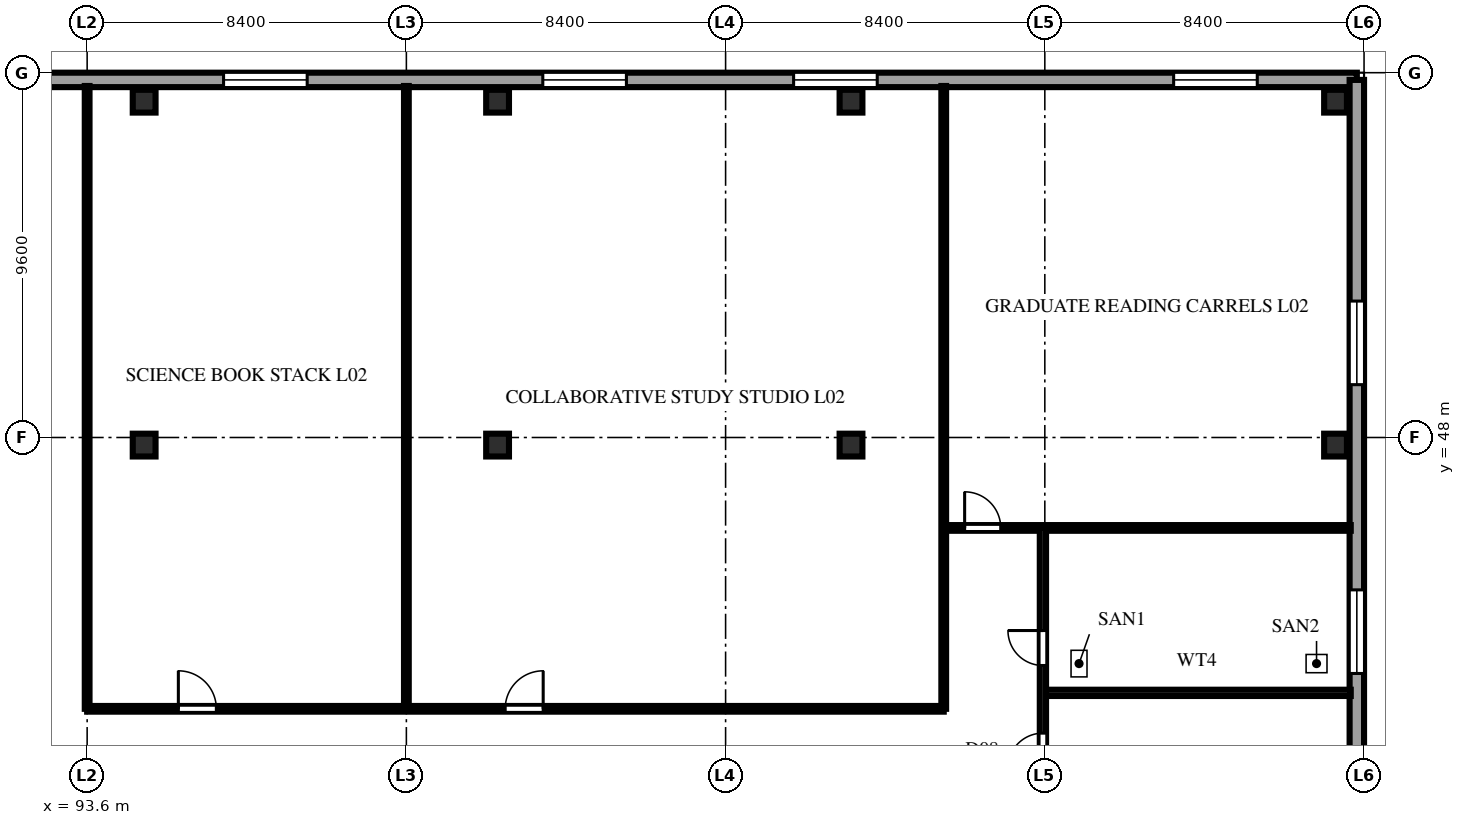
"""IFC4 building model, lengths in metres.
Left out: names, types, materials, properties, quantities, classifications, styles, units other than length and angle.
Written with IfcOpenShell. Run it as: python <this file> out.ifc"""

import sys

from ifc_helpers import new_model, si_unit, direction, frame, frame_2d, origin, origin_2d, place, context, subcontext, project, spatial, rectangle, extrude, element, fill, save


model = new_model("IFC4")
c1 = context("Model", 3, precision=1e-05, world=origin(), true_north=direction((0.0, 1.0)))
c2 = subcontext(c1, "Body", "Model", "MODEL_VIEW")
j1 = project(units=[si_unit("LENGTHUNIT", "METRE"), si_unit("PLANEANGLEUNIT", "RADIAN")], contexts=[c1])
p1 = place(None, origin())
s1 = spatial("IfcSite", under=j1, at=p1, CompositionType="ELEMENT")
p2 = place(p1, origin())
s2 = spatial("IfcBuilding", under=s1, at=p2, CompositionType="ELEMENT")
p3 = place(p2, frame((0.0, 0.0, 10.4)))
s3 = spatial("IfcBuildingStorey", under=s2, at=p3, CompositionType="ELEMENT", Elevation=10.4)
for number, where, z_axis, x_axis in (
    (1, (95.1, 47.8, 0.0), (0.0, 0.0, 1.0), (1.0, 0.0, 0.0)),
    (2, (95.1, 56.85, 0.0), (0.0, 0.0, 1.0), (1.0, 0.0, 0.0)),
    (3, (104.4, 47.8, 0.0), (0.0, 0.0, 1.0), (1.0, 0.0, 0.0)),
    (4, (104.4, 56.85, 0.0), (0.0, 0.0, 1.0), (1.0, 0.0, 0.0)),
    (5, (113.7, 47.8, 0.0), (0.0, 0.0, 1.0), (1.0, 0.0, 0.0)),
    (6, (113.7, 56.85, 0.0), (0.0, 0.0, 1.0), (1.0, 0.0, 0.0)),
    (7, (126.45, 47.8, 0.0), (0.0, 0.0, 1.0), (1.0, 0.0, 0.0)),
    (8, (126.45, 56.85, 0.0), (0.0, 0.0, 1.0), (1.0, 0.0, 0.0)),
):
    element("IfcColumn", number, at=place(p3, frame(where, z_axis=z_axis, x_axis=x_axis)), inside=s3, PredefinedType="COLUMN", context=c2, shape_type="SweptSolid", body=[
        extrude(rectangle(XDim=0.6, YDim=0.6, at=origin_2d()), origin(), (0.0, 0.0, 1.0), 4.6),
    ])
p4 = place(p3, frame((85.39, 57.41, 0.0), z_axis=(0.0, 0.0, 1.0), x_axis=(1.0, 0.0, 0.0)))
e9 = element("IfcWall", 9, at=p4, inside=s3, PredefinedType="SOLIDWALL", context=c2, shape_type="SweptSolid", body=[
    extrude(rectangle(XDim=41.62, YDim=0.38, at=frame_2d((20.81, 0.0))), origin(), (0.0, 0.0, 1.0), 4.25),
])
p5 = place(p4, frame((5.0, 0.0, 0.85)))
e10 = element("IfcOpeningElement", 10, at=p5, cuts=e9, PredefinedType="OPENING", context=c2, shape_type="SweptSolid", body=[
    extrude(rectangle(XDim=2.2, YDim=2.25, at=frame_2d((1.1, 1.125))), frame((0.0, 0.202, 0.0), z_axis=(0.0, -1.0, 0.0), x_axis=(1.0, 0.0, 0.0)), (0.0, 0.0, 1.0), 0.404),
])
p6 = place(p4, frame((11.8, 0.0, 0.85)))
e11 = element("IfcOpeningElement", 11, at=p6, cuts=e9, PredefinedType="OPENING", context=c2, shape_type="SweptSolid", body=[
    extrude(rectangle(XDim=2.2, YDim=2.25, at=frame_2d((1.1, 1.125))), frame((0.0, 0.202, 0.0), z_axis=(0.0, -1.0, 0.0), x_axis=(1.0, 0.0, 0.0)), (0.0, 0.0, 1.0), 0.404),
])
p7 = place(p4, frame((20.2, 0.0, 0.85)))
e12 = element("IfcOpeningElement", 12, at=p7, cuts=e9, PredefinedType="OPENING", context=c2, shape_type="SweptSolid", body=[
    extrude(rectangle(XDim=2.2, YDim=2.25, at=frame_2d((1.1, 1.125))), frame((0.0, 0.202, 0.0), z_axis=(0.0, -1.0, 0.0), x_axis=(1.0, 0.0, 0.0)), (0.0, 0.0, 1.0), 0.404),
])
p8 = place(p4, frame((26.8, 0.0, 0.85)))
e13 = element("IfcOpeningElement", 13, at=p8, cuts=e9, PredefinedType="OPENING", context=c2, shape_type="SweptSolid", body=[
    extrude(rectangle(XDim=2.2, YDim=2.25, at=frame_2d((1.1, 1.125))), frame((0.0, 0.202, 0.0), z_axis=(0.0, -1.0, 0.0), x_axis=(1.0, 0.0, 0.0)), (0.0, 0.0, 1.0), 0.404),
])
p9 = place(p4, frame((36.8, 0.0, 0.85)))
e14 = element("IfcOpeningElement", 14, at=p9, cuts=e9, PredefinedType="OPENING", context=c2, shape_type="SweptSolid", body=[
    extrude(rectangle(XDim=2.2, YDim=2.25, at=frame_2d((1.1, 1.125))), frame((0.0, 0.202, 0.0), z_axis=(0.0, -1.0, 0.0), x_axis=(1.0, 0.0, 0.0)), (0.0, 0.0, 1.0), 0.404),
])
p10 = place(p3, frame((127.01, 0.19, 0.0), z_axis=(0.0, 0.0, 1.0), x_axis=(0.0, 1.0, 0.0)))
e15 = element("IfcWall", 15, at=p10, inside=s3, PredefinedType="SOLIDWALL", context=c2, shape_type="SweptSolid", body=[
    extrude(rectangle(XDim=57.22, YDim=0.38, at=frame_2d((28.61, 0.0))), origin(), (0.0, 0.0, 1.0), 4.25),
])
p11 = place(p10, frame((3.6, 0.0, 0.85)))
e16 = element("IfcOpeningElement", 16, at=p11, cuts=e15, PredefinedType="OPENING", context=c2, shape_type="SweptSolid", body=[
    extrude(rectangle(XDim=2.2, YDim=2.25, at=frame_2d((1.1, 1.125))), frame((0.0, 0.202, 0.0), z_axis=(0.0, -1.0, 0.0), x_axis=(1.0, 0.0, 0.0)), (0.0, 0.0, 1.0), 0.404),
])
p12 = place(p10, frame((11.2, 0.0, 0.85)))
e17 = element("IfcOpeningElement", 17, at=p12, cuts=e15, PredefinedType="OPENING", context=c2, shape_type="SweptSolid", body=[
    extrude(rectangle(XDim=2.2, YDim=2.25, at=frame_2d((1.1, 1.125))), frame((0.0, 0.202, 0.0), z_axis=(0.0, -1.0, 0.0), x_axis=(1.0, 0.0, 0.0)), (0.0, 0.0, 1.0), 0.404),
])
p13 = place(p10, frame((41.6, 0.0, 0.85)))
e18 = element("IfcOpeningElement", 18, at=p13, cuts=e15, PredefinedType="OPENING", context=c2, shape_type="SweptSolid", body=[
    extrude(rectangle(XDim=2.2, YDim=2.25, at=frame_2d((1.1, 1.125))), frame((0.0, 0.202, 0.0), z_axis=(0.0, -1.0, 0.0), x_axis=(1.0, 0.0, 0.0)), (0.0, 0.0, 1.0), 0.404),
])
p14 = place(p10, frame((49.2, 0.0, 0.85)))
e19 = element("IfcOpeningElement", 19, at=p14, cuts=e15, PredefinedType="OPENING", context=c2, shape_type="SweptSolid", body=[
    extrude(rectangle(XDim=2.2, YDim=2.25, at=frame_2d((1.1, 1.125))), frame((0.0, 0.202, 0.0), z_axis=(0.0, -1.0, 0.0), x_axis=(1.0, 0.0, 0.0)), (0.0, 0.0, 1.0), 0.404),
])
for number, where, z_axis, x_axis in (
    (20, (93.6, 40.86, 0.0), (0.0, 0.0, 1.0), (0.0, 1.0, 0.0)),
    (21, (102.0, 40.86, 0.0), (0.0, 0.0, 1.0), (0.0, 1.0, 0.0)),
    (22, (116.14, 40.86, 0.0), (0.0, 0.0, 1.0), (0.0, 1.0, 0.0)),
):
    element("IfcWall", number, at=place(p3, frame(where, z_axis=z_axis, x_axis=x_axis)), inside=s3, PredefinedType="PARTITIONING", context=c2, shape_type="SweptSolid", body=[
        extrude(rectangle(XDim=16.39, YDim=0.125, at=frame_2d((8.195, 0.0))), origin(), (0.0, 0.0, 1.0), 4.25),
    ])
p15 = place(p3, frame((93.6, 40.86, 0.0), z_axis=(0.0, 0.0, 1.0), x_axis=(1.0, 0.0, 0.0)))
e23 = element("IfcWall", 23, at=p15, inside=s3, PredefinedType="PARTITIONING", context=c2, shape_type="SweptSolid", body=[
    extrude(rectangle(XDim=22.54, YDim=0.15, at=frame_2d((11.27, 0.0))), origin(), (0.0, 0.0, 1.0), 4.25),
])
p16 = place(p15, frame((2.4, 0.0, 0.0)))
e24 = element("IfcOpeningElement", 24, at=p16, cuts=e23, PredefinedType="OPENING", context=c2, shape_type="SweptSolid", body=[
    extrude(rectangle(XDim=1.0, YDim=2.2, at=frame_2d((0.5, 1.1))), frame((0.0, 0.087, 0.0), z_axis=(0.0, -1.0, 0.0), x_axis=(1.0, 0.0, 0.0)), (0.0, 0.0, 1.0), 0.174),
])
p17 = place(p15, frame((11.0, 0.0, 0.0)))
e25 = element("IfcOpeningElement", 25, at=p17, cuts=e23, PredefinedType="OPENING", context=c2, shape_type="SweptSolid", body=[
    extrude(rectangle(XDim=1.0, YDim=2.2, at=frame_2d((0.5, 1.1))), frame((0.0, 0.087, 0.0), z_axis=(0.0, -1.0, 0.0), x_axis=(1.0, 0.0, 0.0)), (0.0, 0.0, 1.0), 0.174),
])
p18 = place(p3, frame((118.75, 41.28, 0.0), z_axis=(0.0, 0.0, 1.0), x_axis=(1.0, 0.0, 0.0)))
e26 = element("IfcWall", 26, at=p18, inside=s3, PredefinedType="PLUMBINGWALL", context=c2, shape_type="SweptSolid", body=[
    extrude(rectangle(XDim=8.1, YDim=0.165, at=frame_2d((4.05, 0.0))), origin(), (0.0, 0.0, 1.0), 4.25),
])
p19 = place(p3, frame((116.14, 45.62, 0.0), z_axis=(0.0, 0.0, 1.0), x_axis=(1.0, 0.0, 0.0)))
e27 = element("IfcWall", 27, at=p19, inside=s3, PredefinedType="PARTITIONING", context=c2, shape_type="SweptSolid", body=[
    extrude(rectangle(XDim=10.71, YDim=0.15, at=frame_2d((5.355, 0.0))), origin(), (0.0, 0.0, 1.0), 4.25),
])
p20 = place(p19, frame((0.55, 0.0, 0.0)))
e28 = element("IfcOpeningElement", 28, at=p20, cuts=e27, PredefinedType="OPENING", context=c2, shape_type="SweptSolid", body=[
    extrude(rectangle(XDim=0.95, YDim=2.15, at=frame_2d((0.475, 1.075))), frame((0.0, 0.087, 0.0), z_axis=(0.0, -1.0, 0.0), x_axis=(1.0, 0.0, 0.0)), (0.0, 0.0, 1.0), 0.174),
])
p21 = place(p3, frame((118.75, 38.4, 0.0), z_axis=(0.0, 0.0, 1.0), x_axis=(0.0, 1.0, 0.0)))
e29 = element("IfcWall", 29, at=p21, inside=s3, PredefinedType="PLUMBINGWALL", context=c2, shape_type="SweptSolid", body=[
    extrude(rectangle(XDim=7.22, YDim=0.165, at=frame_2d((3.61, 0.0))), origin(), (0.0, 0.0, 1.0), 4.25),
])
p22 = place(p21, frame((0.9, 0.0, 0.0)))
e30 = element("IfcOpeningElement", 30, at=p22, cuts=e29, PredefinedType="OPENING", context=c2, shape_type="SweptSolid", body=[
    extrude(rectangle(XDim=0.92, YDim=2.15, at=frame_2d((0.46, 1.075))), frame((0.0, 0.094, 0.0), z_axis=(0.0, -1.0, 0.0), x_axis=(1.0, 0.0, 0.0)), (0.0, 0.0, 1.0), 0.189),
])
p23 = place(p21, frame((3.6, 0.0, 0.0)))
e31 = element("IfcOpeningElement", 31, at=p23, cuts=e29, PredefinedType="OPENING", context=c2, shape_type="SweptSolid", body=[
    extrude(rectangle(XDim=0.92, YDim=2.15, at=frame_2d((0.46, 1.075))), frame((0.0, 0.094, 0.0), z_axis=(0.0, -1.0, 0.0), x_axis=(1.0, 0.0, 0.0)), (0.0, 0.0, 1.0), 0.189),
])
p24 = place(p6, origin())
e32 = element("IfcWindow", 32, at=p24, inside=s3, PartitioningType="DOUBLE_PANEL_VERTICAL", PredefinedType="WINDOW", context=c2, shape_type="SweptSolid", body=[
    extrude(rectangle(XDim=2.2, YDim=2.25, at=frame_2d((1.1, 1.125))), frame((0.0, 0.11, 0.0), z_axis=(0.0, -1.0, 0.0), x_axis=(1.0, 0.0, 0.0)), (0.0, 0.0, 1.0), 0.06),
])
fill(e11, e32)
p25 = place(p7, origin())
e33 = element("IfcWindow", 33, at=p25, inside=s3, PartitioningType="DOUBLE_PANEL_VERTICAL", PredefinedType="WINDOW", context=c2, shape_type="SweptSolid", body=[
    extrude(rectangle(XDim=2.2, YDim=2.25, at=frame_2d((1.1, 1.125))), frame((0.0, 0.11, 0.0), z_axis=(0.0, -1.0, 0.0), x_axis=(1.0, 0.0, 0.0)), (0.0, 0.0, 1.0), 0.06),
])
fill(e12, e33)
p26 = place(p8, origin())
e34 = element("IfcWindow", 34, at=p26, inside=s3, PartitioningType="DOUBLE_PANEL_VERTICAL", PredefinedType="WINDOW", context=c2, shape_type="SweptSolid", body=[
    extrude(rectangle(XDim=2.2, YDim=2.25, at=frame_2d((1.1, 1.125))), frame((0.0, 0.11, 0.0), z_axis=(0.0, -1.0, 0.0), x_axis=(1.0, 0.0, 0.0)), (0.0, 0.0, 1.0), 0.06),
])
fill(e13, e34)
p27 = place(p9, origin())
e35 = element("IfcWindow", 35, at=p27, inside=s3, PartitioningType="DOUBLE_PANEL_VERTICAL", PredefinedType="WINDOW", context=c2, shape_type="SweptSolid", body=[
    extrude(rectangle(XDim=2.2, YDim=2.25, at=frame_2d((1.1, 1.125))), frame((0.0, 0.11, 0.0), z_axis=(0.0, -1.0, 0.0), x_axis=(1.0, 0.0, 0.0)), (0.0, 0.0, 1.0), 0.06),
])
fill(e14, e35)
p28 = place(p13, origin())
e36 = element("IfcWindow", 36, at=p28, inside=s3, PartitioningType="DOUBLE_PANEL_VERTICAL", PredefinedType="WINDOW", context=c2, shape_type="SweptSolid", body=[
    extrude(rectangle(XDim=2.2, YDim=2.25, at=frame_2d((1.1, 1.125))), frame((0.0, 0.11, 0.0), z_axis=(0.0, -1.0, 0.0), x_axis=(1.0, 0.0, 0.0)), (0.0, 0.0, 1.0), 0.06),
])
fill(e18, e36)
p29 = place(p14, origin())
e37 = element("IfcWindow", 37, at=p29, inside=s3, PartitioningType="DOUBLE_PANEL_VERTICAL", PredefinedType="WINDOW", context=c2, shape_type="SweptSolid", body=[
    extrude(rectangle(XDim=2.2, YDim=2.25, at=frame_2d((1.1, 1.125))), frame((0.0, 0.11, 0.0), z_axis=(0.0, -1.0, 0.0), x_axis=(1.0, 0.0, 0.0)), (0.0, 0.0, 1.0), 0.06),
])
fill(e19, e37)
p30 = place(p16, origin())
e38 = element("IfcDoor", 38, at=p30, inside=s3, OperationType="SINGLE_SWING_LEFT", PredefinedType="DOOR", context=c2, shape_type="SweptSolid", body=[
    extrude(rectangle(XDim=1.0, YDim=2.2, at=frame_2d((0.5, 1.1))), frame((0.0, 0.025, 0.0), z_axis=(0.0, -1.0, 0.0), x_axis=(1.0, 0.0, 0.0)), (0.0, 0.0, 1.0), 0.05),
])
fill(e24, e38)
p31 = place(p17, origin())
e39 = element("IfcDoor", 39, at=p31, inside=s3, OperationType="SINGLE_SWING_RIGHT", PredefinedType="DOOR", context=c2, shape_type="SweptSolid", body=[
    extrude(rectangle(XDim=1.0, YDim=2.2, at=frame_2d((0.5, 1.1))), frame((0.0, 0.025, 0.0), z_axis=(0.0, -1.0, 0.0), x_axis=(1.0, 0.0, 0.0)), (0.0, 0.0, 1.0), 0.05),
])
fill(e25, e39)
p32 = place(p20, origin())
e40 = element("IfcDoor", 40, at=p32, inside=s3, OperationType="SINGLE_SWING_LEFT", PredefinedType="DOOR", context=c2, shape_type="SweptSolid", body=[
    extrude(rectangle(XDim=0.95, YDim=2.15, at=frame_2d((0.475, 1.075))), frame((0.0, 0.025, 0.0), z_axis=(0.0, -1.0, 0.0), x_axis=(1.0, 0.0, 0.0)), (0.0, 0.0, 1.0), 0.05),
])
fill(e28, e40)
p33 = place(p22, origin())
e41 = element("IfcDoor", 41, at=p33, inside=s3, OperationType="SINGLE_SWING_LEFT", PredefinedType="DOOR", context=c2, shape_type="SweptSolid", body=[
    extrude(rectangle(XDim=0.92, YDim=2.15, at=frame_2d((0.46, 1.075))), frame((0.0, 0.025, 0.0), z_axis=(0.0, -1.0, 0.0), x_axis=(1.0, 0.0, 0.0)), (0.0, 0.0, 1.0), 0.05),
])
fill(e30, e41)
p34 = place(p23, origin())
e42 = element("IfcDoor", 42, at=p34, inside=s3, OperationType="SINGLE_SWING_RIGHT", PredefinedType="DOOR", context=c2, shape_type="SweptSolid", body=[
    extrude(rectangle(XDim=0.92, YDim=2.15, at=frame_2d((0.46, 1.075))), frame((0.0, 0.025, 0.0), z_axis=(0.0, -1.0, 0.0), x_axis=(1.0, 0.0, 0.0)), (0.0, 0.0, 1.0), 0.05),
])
fill(e31, e42)
save(model, sys.argv[1])
